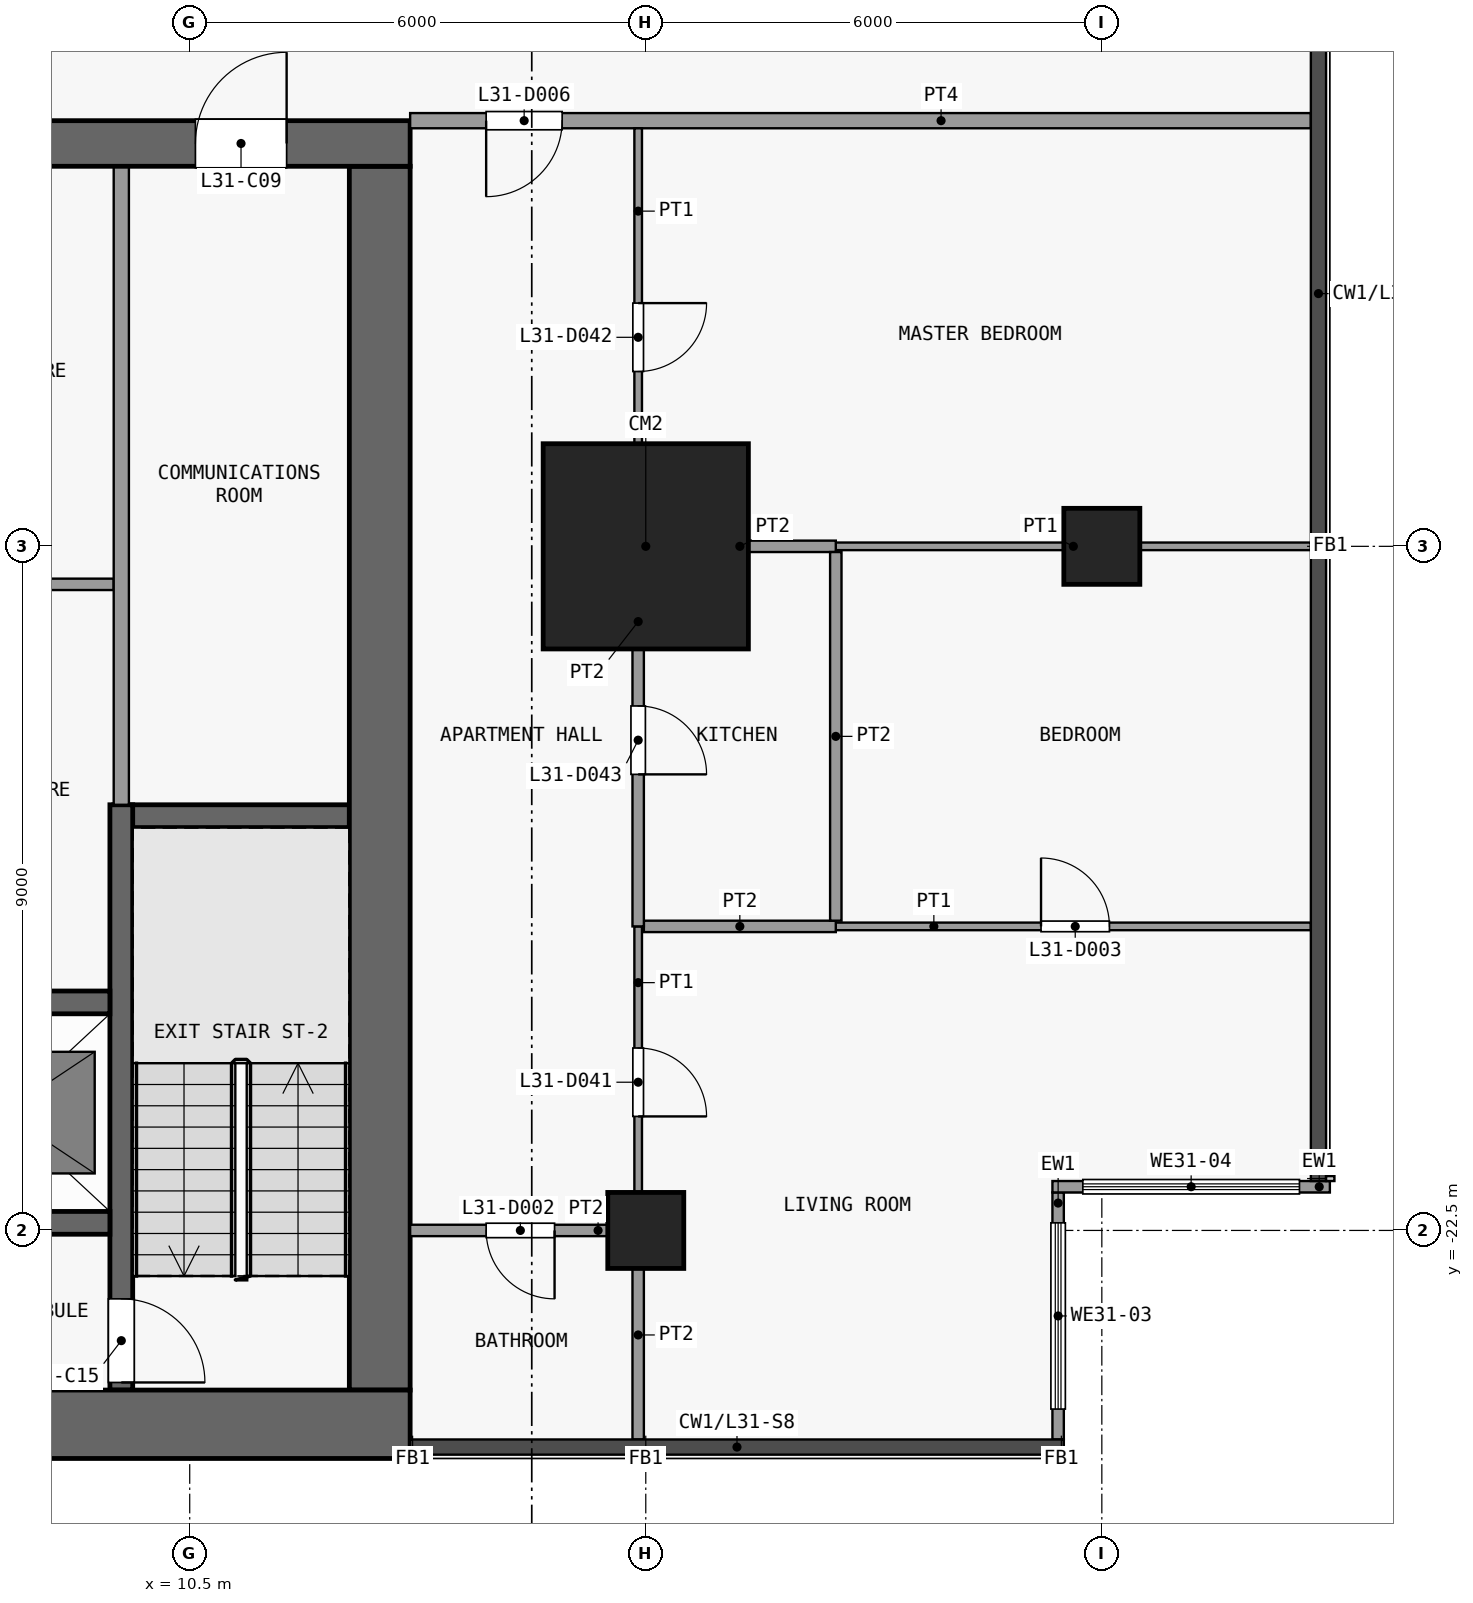
"""IFC4 building model, lengths in metres.
Left out: names, types, materials, properties, quantities, classifications, styles, units other than length and angle.
Written with IfcOpenShell. Run it as: python <this file> out.ifc"""

import sys

from ifc_helpers import new_model, si_unit, direction, frame, frame_2d, origin, origin_2d, place, context, subcontext, project, spatial, rectangle, extrude, element, fill, save


model = new_model("IFC4")
c1 = context("Model", 3, precision=1e-05, world=origin(), true_north=direction((0.0, 1.0)))
c2 = subcontext(c1, "Body", "Model", "MODEL_VIEW")
j1 = project(units=[si_unit("LENGTHUNIT", "METRE"), si_unit("PLANEANGLEUNIT", "RADIAN")], contexts=[c1])
p1 = place(None, origin())
s1 = spatial("IfcSite", under=j1, at=p1, CompositionType="ELEMENT")
p2 = place(p1, origin())
s2 = spatial("IfcBuilding", under=s1, at=p2, CompositionType="ELEMENT")
p3 = place(p2, frame((0.0, 0.0, 124.3)))
s3 = spatial("IfcBuildingStorey", under=s2, at=p3, CompositionType="ELEMENT", Elevation=124.3)
p4 = place(p3, frame((16.5, -22.5, 0.0), z_axis=(0.0, 0.0, 1.0), x_axis=(1.0, 0.0, 0.0)))
e1 = element("IfcColumn", 1, at=p4, inside=s3, PredefinedType="COLUMN", context=c2, shape_type="SweptSolid", body=[
    extrude(rectangle(XDim=1.0, YDim=1.0, at=origin_2d()), origin(), (0.0, 0.0, 1.0), 3.6),
])
p5 = place(p3, frame((16.5, -13.5, 0.0), z_axis=(0.0, 0.0, 1.0), x_axis=(1.0, 0.0, 0.0)))
e2 = element("IfcColumn", 2, at=p5, inside=s3, PredefinedType="COLUMN", context=c2, shape_type="SweptSolid", body=[
    extrude(rectangle(XDim=2.7, YDim=2.7, at=origin_2d()), origin(), (0.0, 0.0, 1.0), 3.6),
])
p6 = place(p3, frame((22.5, -13.5, 0.0), z_axis=(0.0, 0.0, 1.0), x_axis=(1.0, 0.0, 0.0)))
e3 = element("IfcColumn", 3, at=p6, inside=s3, PredefinedType="COLUMN", context=c2, shape_type="SweptSolid", body=[
    extrude(rectangle(XDim=1.0, YDim=1.0, at=origin_2d()), origin(), (0.0, 0.0, 1.0), 3.6),
])
p7 = place(p3, frame((-13.4, -25.05, 0.0), z_axis=(0.0, 0.0, 1.0), x_axis=(1.0, 0.0, 0.0)))
e4 = element("IfcWall", 4, at=p7, inside=s3, PredefinedType="SHEAR", context=c2, shape_type="SweptSolid", body=[
    extrude(rectangle(XDim=26.8, YDim=0.9, at=frame_2d((13.4, 0.0))), origin(), (0.0, 0.0, 1.0), 3.3),
])
p8 = place(p3, frame((-13.4, -8.2, 0.0), z_axis=(0.0, 0.0, 1.0), x_axis=(1.0, 0.0, 0.0)))
e5 = element("IfcWall", 5, at=p8, inside=s3, PredefinedType="SHEAR", context=c2, shape_type="SweptSolid", body=[
    extrude(rectangle(XDim=26.8, YDim=0.6, at=frame_2d((13.4, 0.0))), origin(), (0.0, 0.0, 1.0), 3.3),
])
p9 = place(p8, frame((7.7, 0.0, 0.0)))
e6 = element("IfcOpeningElement", 6, at=p9, cuts=e5, PredefinedType="OPENING", context=c2, shape_type="SweptSolid", body=[
    extrude(rectangle(XDim=1.8, YDim=2.1, at=frame_2d((0.9, 1.05))), frame((0.0, 0.31, 0.0), z_axis=(0.0, -1.0, 0.0), x_axis=(1.0, 0.0, 0.0)), (0.0, 0.0, 1.0), 0.62),
])
p10 = place(p8, frame((17.3, 0.0, 0.0)))
e7 = element("IfcOpeningElement", 7, at=p10, cuts=e5, PredefinedType="OPENING", context=c2, shape_type="SweptSolid", body=[
    extrude(rectangle(XDim=1.8, YDim=2.1, at=frame_2d((0.9, 1.05))), frame((0.0, 0.31, 0.0), z_axis=(0.0, -1.0, 0.0), x_axis=(1.0, 0.0, 0.0)), (0.0, 0.0, 1.0), 0.62),
])
p11 = place(p8, frame((2.625, 0.0, 0.0)))
e8 = element("IfcOpeningElement", 8, at=p11, cuts=e5, PredefinedType="OPENING", context=c2, shape_type="SweptSolid", body=[
    extrude(rectangle(XDim=0.9, YDim=2.1, at=frame_2d((0.45, 1.05))), frame((0.0, 0.31, 0.0), z_axis=(0.0, -1.0, 0.0), x_axis=(1.0, 0.0, 0.0)), (0.0, 0.0, 1.0), 0.62),
])
p12 = place(p8, frame((23.975, 0.0, 0.0)))
e9 = element("IfcOpeningElement", 9, at=p12, cuts=e5, PredefinedType="OPENING", context=c2, shape_type="SweptSolid", body=[
    extrude(rectangle(XDim=1.2, YDim=2.1, at=frame_2d((0.6, 1.05))), frame((0.0, 0.31, 0.0), z_axis=(0.0, -1.0, 0.0), x_axis=(1.0, 0.0, 0.0)), (0.0, 0.0, 1.0), 0.62),
])
p13 = place(p3, frame((13.0, -24.6, 0.0), z_axis=(0.0, 0.0, 1.0), x_axis=(0.0, 1.0, 0.0)))
e10 = element("IfcWall", 10, at=p13, inside=s3, PredefinedType="SHEAR", context=c2, shape_type="SweptSolid", body=[
    extrude(rectangle(XDim=16.1, YDim=0.8, at=frame_2d((8.05, 0.0))), origin(), (0.0, 0.0, 1.0), 3.3),
])
p14 = place(p3, frame((6.35, -22.4, 0.0), z_axis=(0.0, 0.0, 1.0), x_axis=(1.0, 0.0, 0.0)))
e11 = element("IfcWall", 11, at=p14, inside=s3, PredefinedType="SHEAR", context=c2, shape_type="SweptSolid", body=[
    extrude(rectangle(XDim=3.1, YDim=0.3, at=frame_2d((1.55, 0.0))), origin(), (0.0, 0.0, 1.0), 3.3),
])
p15 = place(p3, frame((6.425, -19.5, 0.0), z_axis=(0.0, 0.0, 1.0), x_axis=(1.0, 0.0, 0.0)))
e12 = element("IfcWall", 12, at=p15, inside=s3, PredefinedType="SHEAR", context=c2, shape_type="SweptSolid", body=[
    extrude(rectangle(XDim=3.025, YDim=0.3, at=frame_2d((1.512, 0.0))), origin(), (0.0, 0.0, 1.0), 3.3),
])
p16 = place(p3, frame((9.5, -17.05, 0.0), z_axis=(0.0, 0.0, 1.0), x_axis=(1.0, 0.0, 0.0)))
e13 = element("IfcWall", 13, at=p16, inside=s3, PredefinedType="SHEAR", context=c2, shape_type="SweptSolid", body=[
    extrude(rectangle(XDim=3.1, YDim=0.3, at=frame_2d((1.55, 0.0))), origin(), (0.0, 0.0, 1.0), 3.3),
])
p17 = place(p3, frame((6.575, -14.0, 0.0), z_axis=(0.0, 0.0, 1.0), x_axis=(1.0, 0.0, 0.0)))
e14 = element("IfcWall", 14, at=p17, inside=s3, PredefinedType="PARTITIONING", context=c2, shape_type="SweptSolid", body=[
    extrude(rectangle(XDim=2.925, YDim=0.15, at=frame_2d((1.462, 0.0))), origin(), (0.0, 0.0, 1.0), 3.3),
])
p18 = place(p3, frame((9.6, -16.9, 0.0), z_axis=(0.0, 0.0, 1.0), x_axis=(0.0, -1.0, 0.0)))
e15 = element("IfcWall", 15, at=p18, inside=s3, PredefinedType="SHEAR", context=c2, shape_type="SweptSolid", body=[
    extrude(rectangle(XDim=7.7, YDim=0.3, at=frame_2d((3.85, 0.0))), origin(), (0.0, 0.0, 1.0), 3.3),
])
p19 = place(p18, frame((6.5, 0.0, 0.0)))
e16 = element("IfcOpeningElement", 16, at=p19, cuts=e15, PredefinedType="OPENING", context=c2, shape_type="SweptSolid", body=[
    extrude(rectangle(XDim=1.1, YDim=2.1, at=frame_2d((0.55, 1.05))), frame((0.0, 0.16, 0.0), z_axis=(0.0, -1.0, 0.0), x_axis=(1.0, 0.0, 0.0)), (0.0, 0.0, 1.0), 0.32),
])
p20 = place(p3, frame((9.6, -16.9, 0.0), z_axis=(0.0, 0.0, 1.0), x_axis=(0.0, 1.0, 0.0)))
e17 = element("IfcWall", 17, at=p20, inside=s3, PredefinedType="PARTITIONING", context=c2, shape_type="SweptSolid", body=[
    extrude(rectangle(XDim=8.4, YDim=0.2, at=frame_2d((4.2, 0.0))), origin(), (0.0, 0.0, 1.0), 3.3),
])
p21 = place(p3, frame((21.925, -22.0, 0.0), z_axis=(0.0, 0.0, 1.0), x_axis=(0.0, -1.0, 0.0)))
e18 = element("IfcWall", 18, at=p21, inside=s3, PredefinedType="SOLIDWALL", context=c2, shape_type="SweptSolid", body=[
    extrude(rectangle(XDim=3.25, YDim=0.15, at=frame_2d((1.625, 0.0))), origin(), (0.0, 0.0, 1.0), 3.3),
])
p22 = place(p21, frame((0.4, 0.0, 0.9)))
e19 = element("IfcOpeningElement", 19, at=p22, cuts=e18, PredefinedType="OPENING", context=c2, shape_type="SweptSolid", body=[
    extrude(rectangle(XDim=2.45, YDim=2.4, at=frame_2d((1.225, 1.2))), frame((0.0, 0.085, 0.0), z_axis=(0.0, -1.0, 0.0), x_axis=(1.0, 0.0, 0.0)), (0.0, 0.0, 1.0), 0.17),
])
p23 = place(p3, frame((25.5, -21.925, 0.0), z_axis=(0.0, 0.0, 1.0), x_axis=(-1.0, 0.0, 0.0)))
e20 = element("IfcWall", 20, at=p23, inside=s3, PredefinedType="SOLIDWALL", context=c2, shape_type="SweptSolid", body=[
    extrude(rectangle(XDim=3.65, YDim=0.15, at=frame_2d((1.825, 0.0))), origin(), (0.0, 0.0, 1.0), 3.3),
])
p24 = place(p23, frame((0.4, 0.0, 0.9)))
e21 = element("IfcOpeningElement", 21, at=p24, cuts=e20, PredefinedType="OPENING", context=c2, shape_type="SweptSolid", body=[
    extrude(rectangle(XDim=2.85, YDim=2.4, at=frame_2d((1.425, 1.2))), frame((0.0, 0.085, 0.0), z_axis=(0.0, -1.0, 0.0), x_axis=(1.0, 0.0, 0.0)), (0.0, 0.0, 1.0), 0.17),
])
p25 = place(p3, frame((13.4, -22.5, 0.0), z_axis=(0.0, 0.0, 1.0), x_axis=(1.0, 0.0, 0.0)))
e22 = element("IfcWall", 22, at=p25, inside=s3, PredefinedType="PARTITIONING", context=c2, shape_type="SweptSolid", body=[
    extrude(rectangle(XDim=2.925, YDim=0.15, at=frame_2d((1.462, 0.0))), origin(), (0.0, 0.0, 1.0), 3.3),
])
p26 = place(p25, frame((1.0, 0.0, 0.0)))
e23 = element("IfcOpeningElement", 23, at=p26, cuts=e22, PredefinedType="OPENING", context=c2, shape_type="SweptSolid", body=[
    extrude(rectangle(XDim=0.9, YDim=2.1, at=frame_2d((0.45, 1.05))), frame((0.0, 0.085, 0.0), z_axis=(0.0, -1.0, 0.0), x_axis=(1.0, 0.0, 0.0)), (0.0, 0.0, 1.0), 0.17),
])
p27 = place(p3, frame((19.0, -18.5, 0.0), z_axis=(0.0, 0.0, 1.0), x_axis=(1.0, 0.0, 0.0)))
e24 = element("IfcWall", 24, at=p27, inside=s3, PredefinedType="PARTITIONING", context=c2, shape_type="SweptSolid", body=[
    extrude(rectangle(XDim=6.25, YDim=0.1, at=frame_2d((3.125, 0.0))), origin(), (0.0, 0.0, 1.0), 3.3),
])
p28 = place(p27, frame((2.7, 0.0, 0.0)))
e25 = element("IfcOpeningElement", 25, at=p28, cuts=e24, PredefinedType="OPENING", context=c2, shape_type="SweptSolid", body=[
    extrude(rectangle(XDim=0.9, YDim=2.1, at=frame_2d((0.45, 1.05))), frame((0.0, 0.06, 0.0), z_axis=(0.0, -1.0, 0.0), x_axis=(1.0, 0.0, 0.0)), (0.0, 0.0, 1.0), 0.12),
])
p29 = place(p3, frame((16.475, -18.5, 0.0), z_axis=(0.0, 0.0, 1.0), x_axis=(1.0, 0.0, 0.0)))
e26 = element("IfcWall", 26, at=p29, inside=s3, PredefinedType="PARTITIONING", context=c2, shape_type="SweptSolid", body=[
    extrude(rectangle(XDim=2.525, YDim=0.15, at=frame_2d((1.262, 0.0))), origin(), (0.0, 0.0, 1.0), 3.3),
])
p30 = place(p3, frame((19.0, -13.5, 0.0), z_axis=(0.0, 0.0, 1.0), x_axis=(1.0, 0.0, 0.0)))
e27 = element("IfcWall", 27, at=p30, inside=s3, PredefinedType="PARTITIONING", context=c2, shape_type="SweptSolid", body=[
    extrude(rectangle(XDim=6.25, YDim=0.1, at=frame_2d((3.125, 0.0))), origin(), (0.0, 0.0, 1.0), 3.3),
])
p31 = place(p3, frame((16.475, -13.5, 0.0), z_axis=(0.0, 0.0, 1.0), x_axis=(1.0, 0.0, 0.0)))
e28 = element("IfcWall", 28, at=p31, inside=s3, PredefinedType="PARTITIONING", context=c2, shape_type="SweptSolid", body=[
    extrude(rectangle(XDim=2.525, YDim=0.15, at=frame_2d((1.262, 0.0))), origin(), (0.0, 0.0, 1.0), 3.3),
])
p32 = place(p3, frame((13.4, -7.9, 0.0), z_axis=(0.0, 0.0, 1.0), x_axis=(1.0, 0.0, 0.0)))
e29 = element("IfcWall", 29, at=p32, inside=s3, PredefinedType="PARTITIONING", context=c2, shape_type="SweptSolid", body=[
    extrude(rectangle(XDim=11.85, YDim=0.2, at=frame_2d((5.925, 0.0))), origin(), (0.0, 0.0, 1.0), 3.3),
])
p33 = place(p32, frame((1.0, 0.0, 0.0)))
e30 = element("IfcOpeningElement", 30, at=p33, cuts=e29, PredefinedType="OPENING", context=c2, shape_type="SweptSolid", body=[
    extrude(rectangle(XDim=1.0, YDim=2.1, at=frame_2d((0.5, 1.05))), frame((0.0, 0.11, 0.0), z_axis=(0.0, -1.0, 0.0), x_axis=(1.0, 0.0, 0.0)), (0.0, 0.0, 1.0), 0.22),
])
p34 = place(p3, frame((16.4, -22.5, 0.0), z_axis=(0.0, 0.0, 1.0), x_axis=(0.0, 1.0, 0.0)))
e31 = element("IfcWall", 31, at=p34, inside=s3, PredefinedType="PARTITIONING", context=c2, shape_type="SweptSolid", body=[
    extrude(rectangle(XDim=4.0, YDim=0.1, at=frame_2d((2.0, 0.0))), origin(), (0.0, 0.0, 1.0), 3.3),
])
p35 = place(p34, frame((1.5, 0.0, 0.0)))
e32 = element("IfcOpeningElement", 32, at=p35, cuts=e31, PredefinedType="OPENING", context=c2, shape_type="SweptSolid", body=[
    extrude(rectangle(XDim=0.9, YDim=2.1, at=frame_2d((0.45, 1.05))), frame((0.0, 0.06, 0.0), z_axis=(0.0, -1.0, 0.0), x_axis=(1.0, 0.0, 0.0)), (0.0, 0.0, 1.0), 0.12),
])
p36 = place(p3, frame((16.4, -13.5, 0.0), z_axis=(0.0, 0.0, 1.0), x_axis=(0.0, 1.0, 0.0)))
e33 = element("IfcWall", 33, at=p36, inside=s3, PredefinedType="PARTITIONING", context=c2, shape_type="SweptSolid", body=[
    extrude(rectangle(XDim=5.5, YDim=0.1, at=frame_2d((2.75, 0.0))), origin(), (0.0, 0.0, 1.0), 3.3),
])
p37 = place(p36, frame((2.3, 0.0, 0.0)))
e34 = element("IfcOpeningElement", 34, at=p37, cuts=e33, PredefinedType="OPENING", context=c2, shape_type="SweptSolid", body=[
    extrude(rectangle(XDim=0.9, YDim=2.1, at=frame_2d((0.45, 1.05))), frame((0.0, 0.06, 0.0), z_axis=(0.0, -1.0, 0.0), x_axis=(1.0, 0.0, 0.0)), (0.0, 0.0, 1.0), 0.12),
])
p38 = place(p3, frame((16.4, -25.25, 0.0), z_axis=(0.0, 0.0, 1.0), x_axis=(0.0, 1.0, 0.0)))
e35 = element("IfcWall", 35, at=p38, inside=s3, PredefinedType="PARTITIONING", context=c2, shape_type="SweptSolid", body=[
    extrude(rectangle(XDim=2.75, YDim=0.15, at=frame_2d((1.375, 0.0))), origin(), (0.0, 0.0, 1.0), 3.3),
])
p39 = place(p3, frame((16.4, -18.5, 0.0), z_axis=(0.0, 0.0, 1.0), x_axis=(0.0, 1.0, 0.0)))
e36 = element("IfcWall", 36, at=p39, inside=s3, PredefinedType="PARTITIONING", context=c2, shape_type="SweptSolid", body=[
    extrude(rectangle(XDim=5.0, YDim=0.15, at=frame_2d((2.5, 0.0))), origin(), (0.0, 0.0, 1.0), 3.3),
])
p40 = place(p39, frame((2.0, 0.0, 0.0)))
e37 = element("IfcOpeningElement", 37, at=p40, cuts=e36, PredefinedType="OPENING", context=c2, shape_type="SweptSolid", body=[
    extrude(rectangle(XDim=0.9, YDim=2.1, at=frame_2d((0.45, 1.05))), frame((0.0, 0.085, 0.0), z_axis=(0.0, -1.0, 0.0), x_axis=(1.0, 0.0, 0.0)), (0.0, 0.0, 1.0), 0.17),
])
p41 = place(p3, frame((19.0, -18.425, 0.0), z_axis=(0.0, 0.0, 1.0), x_axis=(0.0, 1.0, 0.0)))
e38 = element("IfcWall", 38, at=p41, inside=s3, PredefinedType="PARTITIONING", context=c2, shape_type="SweptSolid", body=[
    extrude(rectangle(XDim=4.85, YDim=0.15, at=frame_2d((2.425, 0.0))), origin(), (0.0, 0.0, 1.0), 3.3),
])
p42 = place(p12, origin())
e39 = element("IfcDoor", 39, at=p42, inside=s3, OperationType="SINGLE_SWING_RIGHT", PredefinedType="DOOR", context=c2, shape_type="SweptSolid", body=[
    extrude(rectangle(XDim=1.2, YDim=2.1, at=frame_2d((0.6, 1.05))), frame((0.0, 0.025, 0.0), z_axis=(0.0, -1.0, 0.0), x_axis=(1.0, 0.0, 0.0)), (0.0, 0.0, 1.0), 0.05),
])
fill(e9, e39)
p43 = place(p19, origin())
e40 = element("IfcDoor", 40, at=p43, inside=s3, OperationType="SINGLE_SWING_RIGHT", PredefinedType="DOOR", context=c2, shape_type="SweptSolid", body=[
    extrude(rectangle(XDim=1.1, YDim=2.1, at=frame_2d((0.55, 1.05))), frame((0.0, 0.025, 0.0), z_axis=(0.0, -1.0, 0.0), x_axis=(1.0, 0.0, 0.0)), (0.0, 0.0, 1.0), 0.05),
])
fill(e16, e40)
p44 = place(p22, origin())
e41 = element("IfcWindow", 41, at=p44, inside=s3, PartitioningType="SINGLE_PANEL", PredefinedType="WINDOW", context=c2, shape_type="SweptSolid", body=[
    extrude(rectangle(XDim=2.45, YDim=2.4, at=frame_2d((1.225, 1.2))), frame((0.0, 0.03, 0.0), z_axis=(0.0, -1.0, 0.0), x_axis=(1.0, 0.0, 0.0)), (0.0, 0.0, 1.0), 0.06),
])
fill(e19, e41)
p45 = place(p24, origin())
e42 = element("IfcWindow", 42, at=p45, inside=s3, PartitioningType="SINGLE_PANEL", PredefinedType="WINDOW", context=c2, shape_type="SweptSolid", body=[
    extrude(rectangle(XDim=2.85, YDim=2.4, at=frame_2d((1.425, 1.2))), frame((0.0, 0.03, 0.0), z_axis=(0.0, -1.0, 0.0), x_axis=(1.0, 0.0, 0.0)), (0.0, 0.0, 1.0), 0.06),
])
fill(e21, e42)
p46 = place(p26, origin())
e43 = element("IfcDoor", 43, at=p46, inside=s3, OperationType="SINGLE_SWING_RIGHT", PredefinedType="DOOR", context=c2, shape_type="SweptSolid", body=[
    extrude(rectangle(XDim=0.9, YDim=2.1, at=frame_2d((0.45, 1.05))), frame((0.0, 0.025, 0.0), z_axis=(0.0, -1.0, 0.0), x_axis=(1.0, 0.0, 0.0)), (0.0, 0.0, 1.0), 0.05),
])
fill(e23, e43)
p47 = place(p28, origin())
e44 = element("IfcDoor", 44, at=p47, inside=s3, OperationType="SINGLE_SWING_RIGHT", PredefinedType="DOOR", context=c2, shape_type="SweptSolid", body=[
    extrude(rectangle(XDim=0.9, YDim=2.1, at=frame_2d((0.45, 1.05))), frame((0.0, 0.025, 0.0), z_axis=(0.0, -1.0, 0.0), x_axis=(1.0, 0.0, 0.0)), (0.0, 0.0, 1.0), 0.05),
])
fill(e25, e44)
p48 = place(p33, origin())
e45 = element("IfcDoor", 45, at=p48, inside=s3, OperationType="SINGLE_SWING_LEFT", PredefinedType="DOOR", context=c2, shape_type="SweptSolid", body=[
    extrude(rectangle(XDim=1.0, YDim=2.1, at=frame_2d((0.5, 1.05))), frame((0.0, 0.025, 0.0), z_axis=(0.0, -1.0, 0.0), x_axis=(1.0, 0.0, 0.0)), (0.0, 0.0, 1.0), 0.05),
])
fill(e30, e45)
p49 = place(p35, origin())
e46 = element("IfcDoor", 46, at=p49, inside=s3, OperationType="SINGLE_SWING_LEFT", PredefinedType="DOOR", context=c2, shape_type="SweptSolid", body=[
    extrude(rectangle(XDim=0.9, YDim=2.1, at=frame_2d((0.45, 1.05))), frame((0.0, 0.025, 0.0), z_axis=(0.0, -1.0, 0.0), x_axis=(1.0, 0.0, 0.0)), (0.0, 0.0, 1.0), 0.05),
])
fill(e32, e46)
p50 = place(p37, origin())
e47 = element("IfcDoor", 47, at=p50, inside=s3, OperationType="SINGLE_SWING_RIGHT", PredefinedType="DOOR", context=c2, shape_type="SweptSolid", body=[
    extrude(rectangle(XDim=0.9, YDim=2.1, at=frame_2d((0.45, 1.05))), frame((0.0, 0.025, 0.0), z_axis=(0.0, -1.0, 0.0), x_axis=(1.0, 0.0, 0.0)), (0.0, 0.0, 1.0), 0.05),
])
fill(e34, e47)
p51 = place(p40, origin())
e48 = element("IfcDoor", 48, at=p51, inside=s3, OperationType="SINGLE_SWING_LEFT", PredefinedType="DOOR", context=c2, shape_type="SweptSolid", body=[
    extrude(rectangle(XDim=0.9, YDim=2.1, at=frame_2d((0.45, 1.05))), frame((0.0, 0.025, 0.0), z_axis=(0.0, -1.0, 0.0), x_axis=(1.0, 0.0, 0.0)), (0.0, 0.0, 1.0), 0.05),
])
fill(e37, e48)
save(model, sys.argv[1])
